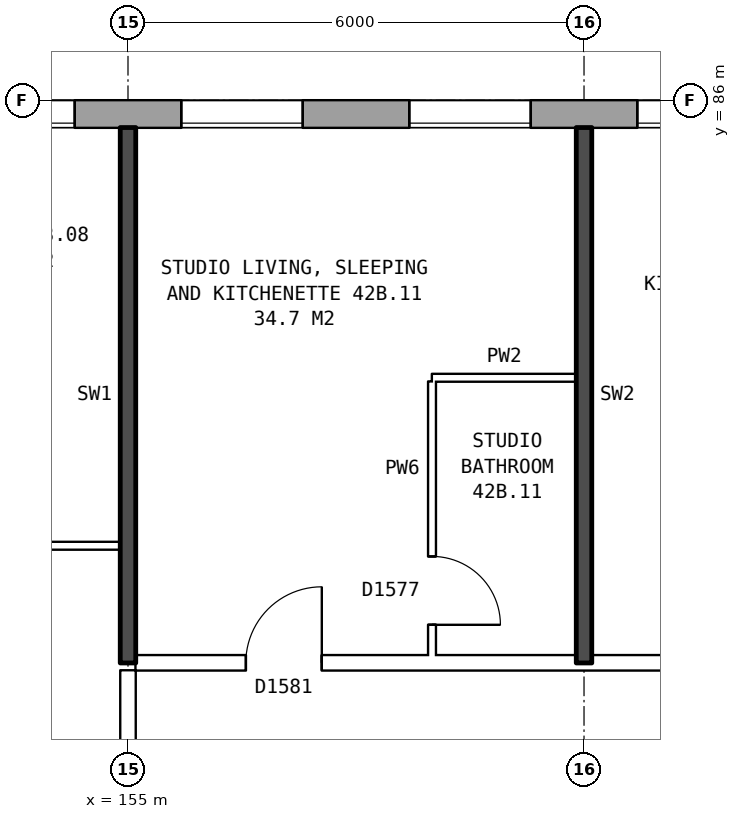
"""IFC4 building model, lengths in metres.
Left out: names, types, materials, properties, quantities, classifications, styles, units other than length and angle.
Written with IfcOpenShell. Run it as: python <this file> out.ifc"""

import sys

from ifc_helpers import new_model, si_unit, direction, frame, frame_2d, origin, place, context, subcontext, project, spatial, rectangle, extrude, element, fill, save


model = new_model("IFC4")
c1 = context("Model", 3, precision=1e-05, world=origin(), true_north=direction((0.0, 1.0)))
c2 = subcontext(c1, "Body", "Model", "MODEL_VIEW")
j1 = project(units=[si_unit("LENGTHUNIT", "METRE"), si_unit("PLANEANGLEUNIT", "RADIAN")], contexts=[c1])
p1 = place(None, origin())
s1 = spatial("IfcSite", under=j1, at=p1, CompositionType="ELEMENT")
p2 = place(p1, origin())
s2 = spatial("IfcBuilding", under=s1, at=p2, CompositionType="ELEMENT")
p3 = place(p2, frame((0.0, 0.0, 151.6)))
s3 = spatial("IfcBuildingStorey", under=s2, at=p3, CompositionType="ELEMENT", Elevation=151.6)
p4 = place(p3, frame((168.425, 85.82, 0.0), z_axis=(0.0, 0.0, 1.0), x_axis=(-1.0, 0.0, 0.0)))
e1 = element("IfcWall", 1, at=p4, inside=s3, PredefinedType="STANDARD", context=c2, shape_type="SweptSolid", body=[
    extrude(rectangle(XDim=34.351, YDim=0.36, at=frame_2d((17.175, 0.0))), origin(), (0.0, 0.0, 1.0), 2.85),
])
p5 = place(p4, frame((3.225, 0.0, 0.8)))
e2 = element("IfcOpeningElement", 2, at=p5, cuts=e1, PredefinedType="OPENING", context=c2, shape_type="SweptSolid", body=[
    extrude(rectangle(XDim=0.6, YDim=0.9, at=frame_2d((0.3, 0.45))), frame((0.0, 0.19, 0.0), z_axis=(0.0, -1.0, 0.0), x_axis=(1.0, 0.0, 0.0)), (0.0, 0.0, 1.0), 0.38),
])
p6 = place(p4, frame((5.125, 0.0, 0.8)))
e3 = element("IfcOpeningElement", 3, at=p6, cuts=e1, PredefinedType="OPENING", context=c2, shape_type="SweptSolid", body=[
    extrude(rectangle(XDim=1.6, YDim=1.8, at=frame_2d((0.8, 0.9))), frame((0.0, 0.19, 0.0), z_axis=(0.0, -1.0, 0.0), x_axis=(1.0, 0.0, 0.0)), (0.0, 0.0, 1.0), 0.38),
])
p7 = place(p4, frame((8.125, 0.0, 0.8)))
e4 = element("IfcOpeningElement", 4, at=p7, cuts=e1, PredefinedType="OPENING", context=c2, shape_type="SweptSolid", body=[
    extrude(rectangle(XDim=1.6, YDim=1.8, at=frame_2d((0.8, 0.9))), frame((0.0, 0.19, 0.0), z_axis=(0.0, -1.0, 0.0), x_axis=(1.0, 0.0, 0.0)), (0.0, 0.0, 1.0), 0.38),
])
p8 = place(p4, frame((11.125, 0.0, 0.8)))
e5 = element("IfcOpeningElement", 5, at=p8, cuts=e1, PredefinedType="OPENING", context=c2, shape_type="SweptSolid", body=[
    extrude(rectangle(XDim=1.6, YDim=1.8, at=frame_2d((0.8, 0.9))), frame((0.0, 0.19, 0.0), z_axis=(0.0, -1.0, 0.0), x_axis=(1.0, 0.0, 0.0)), (0.0, 0.0, 1.0), 0.38),
])
p9 = place(p4, frame((14.125, 0.0, 0.8)))
e6 = element("IfcOpeningElement", 6, at=p9, cuts=e1, PredefinedType="OPENING", context=c2, shape_type="SweptSolid", body=[
    extrude(rectangle(XDim=1.6, YDim=1.8, at=frame_2d((0.8, 0.9))), frame((0.0, 0.19, 0.0), z_axis=(0.0, -1.0, 0.0), x_axis=(1.0, 0.0, 0.0)), (0.0, 0.0, 1.0), 0.38),
])
p10 = place(p4, frame((17.125, 0.0, 0.8)))
e7 = element("IfcOpeningElement", 7, at=p10, cuts=e1, PredefinedType="OPENING", context=c2, shape_type="SweptSolid", body=[
    extrude(rectangle(XDim=1.6, YDim=1.8, at=frame_2d((0.8, 0.9))), frame((0.0, 0.19, 0.0), z_axis=(0.0, -1.0, 0.0), x_axis=(1.0, 0.0, 0.0)), (0.0, 0.0, 1.0), 0.38),
])
p11 = place(p4, frame((20.125, 0.0, 0.8)))
e8 = element("IfcOpeningElement", 8, at=p11, cuts=e1, PredefinedType="OPENING", context=c2, shape_type="SweptSolid", body=[
    extrude(rectangle(XDim=1.6, YDim=1.8, at=frame_2d((0.8, 0.9))), frame((0.0, 0.19, 0.0), z_axis=(0.0, -1.0, 0.0), x_axis=(1.0, 0.0, 0.0)), (0.0, 0.0, 1.0), 0.38),
])
p12 = place(p4, frame((23.125, 0.0, 0.8)))
e9 = element("IfcOpeningElement", 9, at=p12, cuts=e1, PredefinedType="OPENING", context=c2, shape_type="SweptSolid", body=[
    extrude(rectangle(XDim=1.6, YDim=1.8, at=frame_2d((0.8, 0.9))), frame((0.0, 0.19, 0.0), z_axis=(0.0, -1.0, 0.0), x_axis=(1.0, 0.0, 0.0)), (0.0, 0.0, 1.0), 0.38),
])
p13 = place(p4, frame((26.125, 0.0, 0.8)))
e10 = element("IfcOpeningElement", 10, at=p13, cuts=e1, PredefinedType="OPENING", context=c2, shape_type="SweptSolid", body=[
    extrude(rectangle(XDim=1.6, YDim=1.8, at=frame_2d((0.8, 0.9))), frame((0.0, 0.19, 0.0), z_axis=(0.0, -1.0, 0.0), x_axis=(1.0, 0.0, 0.0)), (0.0, 0.0, 1.0), 0.38),
])
p14 = place(p4, frame((28.025, 0.0, 0.8)))
e11 = element("IfcOpeningElement", 11, at=p14, cuts=e1, PredefinedType="OPENING", context=c2, shape_type="SweptSolid", body=[
    extrude(rectangle(XDim=1.4, YDim=1.8, at=frame_2d((0.7, 0.9))), frame((0.0, 0.19, 0.0), z_axis=(0.0, -1.0, 0.0), x_axis=(1.0, 0.0, 0.0)), (0.0, 0.0, 1.0), 0.38),
])
p15 = place(p4, frame((32.275, 0.0, 1.7)))
e12 = element("IfcOpeningElement", 12, at=p15, cuts=e1, PredefinedType="OPENING", context=c2, shape_type="SweptSolid", body=[
    extrude(rectangle(XDim=0.6, YDim=0.9, at=frame_2d((0.3, 0.45))), frame((0.0, 0.19, 0.0), z_axis=(0.0, -1.0, 0.0), x_axis=(1.0, 0.0, 0.0)), (0.0, 0.0, 1.0), 0.38),
])
p16 = place(p4, frame((4.225, 0.0, 0.8)))
e13 = element("IfcOpeningElement", 13, at=p16, cuts=e1, PredefinedType="OPENING", context=c2, shape_type="SweptSolid", body=[
    extrude(rectangle(XDim=0.6, YDim=1.8, at=frame_2d((0.3, 0.9))), frame((0.0, 0.19, 0.0), z_axis=(0.0, -1.0, 0.0), x_axis=(1.0, 0.0, 0.0)), (0.0, 0.0, 1.0), 0.38),
])
p17 = place(p4, frame((29.725, 0.0, 0.8)))
e14 = element("IfcOpeningElement", 14, at=p17, cuts=e1, PredefinedType="OPENING", context=c2, shape_type="SweptSolid", body=[
    extrude(rectangle(XDim=1.0, YDim=1.2, at=frame_2d((0.5, 0.6))), frame((0.0, 0.19, 0.0), z_axis=(0.0, -1.0, 0.0), x_axis=(1.0, 0.0, 0.0)), (0.0, 0.0, 1.0), 0.38),
])
p18 = place(p4, frame((33.225, 0.0, 0.8)))
e15 = element("IfcOpeningElement", 15, at=p18, cuts=e1, PredefinedType="OPENING", context=c2, shape_type="SweptSolid", body=[
    extrude(rectangle(XDim=0.8, YDim=1.8, at=frame_2d((0.4, 0.9))), frame((0.0, 0.19, 0.0), z_axis=(0.0, -1.0, 0.0), x_axis=(1.0, 0.0, 0.0)), (0.0, 0.0, 1.0), 0.38),
])
p19 = place(p3, frame((155.1, 78.6, 0.0), z_axis=(0.0, 0.0, 1.0), x_axis=(1.0, 0.0, 0.0)))
e16 = element("IfcWall", 16, at=p19, inside=s3, PredefinedType="PARTITIONING", context=c2, shape_type="SweptSolid", body=[
    extrude(rectangle(XDim=16.04, YDim=0.2, at=frame_2d((8.02, 0.0))), origin(), (0.0, 0.0, 1.0), 2.85),
])
p20 = place(p19, frame((1.45, 0.0, 0.0)))
e17 = element("IfcOpeningElement", 17, at=p20, cuts=e16, PredefinedType="OPENING", context=c2, shape_type="SweptSolid", body=[
    extrude(rectangle(XDim=1.0, YDim=2.1, at=frame_2d((0.5, 1.05))), frame((0.0, 0.11, 0.0), z_axis=(0.0, -1.0, 0.0), x_axis=(1.0, 0.0, 0.0)), (0.0, 0.0, 1.0), 0.22),
])
p21 = place(p19, frame((8.4, 0.0, 0.0)))
e18 = element("IfcOpeningElement", 18, at=p21, cuts=e16, PredefinedType="OPENING", context=c2, shape_type="SweptSolid", body=[
    extrude(rectangle(XDim=1.0, YDim=2.1, at=frame_2d((0.5, 1.05))), frame((0.0, 0.11, 0.0), z_axis=(0.0, -1.0, 0.0), x_axis=(1.0, 0.0, 0.0)), (0.0, 0.0, 1.0), 0.22),
])
p22 = place(p3, frame((152.0, 80.14, 0.0), z_axis=(0.0, 0.0, 1.0), x_axis=(1.0, 0.0, 0.0)))
e19 = element("IfcWall", 19, at=p22, inside=s3, PredefinedType="PARTITIONING", context=c2, shape_type="SweptSolid", body=[
    extrude(rectangle(XDim=2.9, YDim=0.1, at=frame_2d((1.45, 0.0))), origin(), (0.0, 0.0, 1.0), 2.85),
])
p23 = place(p22, frame((1.0, 0.0, 0.0)))
e20 = element("IfcOpeningElement", 20, at=p23, cuts=e19, PredefinedType="OPENING", context=c2, shape_type="SweptSolid", body=[
    extrude(rectangle(XDim=0.9, YDim=2.1, at=frame_2d((0.45, 1.05))), frame((0.0, 0.06, 0.0), z_axis=(0.0, -1.0, 0.0), x_axis=(1.0, 0.0, 0.0)), (0.0, 0.0, 1.0), 0.12),
])
p24 = place(p3, frame((159.0, 82.35, 0.0), z_axis=(0.0, 0.0, 1.0), x_axis=(1.0, 0.0, 0.0)))
e21 = element("IfcWall", 21, at=p24, inside=s3, PredefinedType="PARTITIONING", context=c2, shape_type="SweptSolid", body=[
    extrude(rectangle(XDim=1.9, YDim=0.1, at=frame_2d((0.95, 0.0))), origin(), (0.0, 0.0, 1.0), 2.85),
])
p25 = place(p3, frame((155.0, 76.3, 0.0), z_axis=(0.0, 0.0, 1.0), x_axis=(0.0, 1.0, 0.0)))
e22 = element("IfcWall", 22, at=p25, inside=s3, PredefinedType="PARTITIONING", context=c2, shape_type="SweptSolid", body=[
    extrude(rectangle(XDim=2.2, YDim=0.2, at=frame_2d((1.1, 0.0))), origin(), (0.0, 0.0, 1.0), 2.85),
])
p26 = place(p3, frame((155.0, 78.6, 0.0), z_axis=(0.0, 0.0, 1.0), x_axis=(0.0, 1.0, 0.0)))
e23 = element("IfcWall", 23, at=p26, inside=s3, PredefinedType="SOLIDWALL", context=c2, shape_type="SweptSolid", body=[
    extrude(rectangle(XDim=7.04, YDim=0.2, at=frame_2d((3.52, 0.0))), origin(), (0.0, 0.0, 1.0), 2.85),
])
p27 = place(p3, frame((159.0, 78.7, 0.0), z_axis=(0.0, 0.0, 1.0), x_axis=(0.0, 1.0, 0.0)))
e24 = element("IfcWall", 24, at=p27, inside=s3, PredefinedType="PARTITIONING", context=c2, shape_type="SweptSolid", body=[
    extrude(rectangle(XDim=3.6, YDim=0.1, at=frame_2d((1.8, 0.0))), origin(), (0.0, 0.0, 1.0), 2.85),
])
p28 = place(p27, frame((0.4, 0.0, 0.0)))
e25 = element("IfcOpeningElement", 25, at=p28, cuts=e24, PredefinedType="OPENING", context=c2, shape_type="SweptSolid", body=[
    extrude(rectangle(XDim=0.9, YDim=2.1, at=frame_2d((0.45, 1.05))), frame((0.0, 0.06, 0.0), z_axis=(0.0, -1.0, 0.0), x_axis=(1.0, 0.0, 0.0)), (0.0, 0.0, 1.0), 0.12),
])
p29 = place(p3, frame((161.0, 78.6, 0.0), z_axis=(0.0, 0.0, 1.0), x_axis=(0.0, 1.0, 0.0)))
e26 = element("IfcWall", 26, at=p29, inside=s3, PredefinedType="SOLIDWALL", context=c2, shape_type="SweptSolid", body=[
    extrude(rectangle(XDim=7.04, YDim=0.2, at=frame_2d((3.52, 0.0))), origin(), (0.0, 0.0, 1.0), 2.85),
])
p30 = place(p6, origin())
e27 = element("IfcWindow", 27, at=p30, inside=s3, PartitioningType="SINGLE_PANEL", PredefinedType="WINDOW", context=c2, shape_type="SweptSolid", body=[
    extrude(rectangle(XDim=1.6, YDim=1.8, at=frame_2d((0.8, 0.9))), frame((0.0, 0.15, 0.0), z_axis=(0.0, -1.0, 0.0), x_axis=(1.0, 0.0, 0.0)), (0.0, 0.0, 1.0), 0.06),
])
fill(e3, e27)
p31 = place(p7, origin())
e28 = element("IfcWindow", 28, at=p31, inside=s3, PartitioningType="SINGLE_PANEL", PredefinedType="WINDOW", context=c2, shape_type="SweptSolid", body=[
    extrude(rectangle(XDim=1.6, YDim=1.8, at=frame_2d((0.8, 0.9))), frame((0.0, 0.15, 0.0), z_axis=(0.0, -1.0, 0.0), x_axis=(1.0, 0.0, 0.0)), (0.0, 0.0, 1.0), 0.06),
])
fill(e4, e28)
p32 = place(p8, origin())
e29 = element("IfcWindow", 29, at=p32, inside=s3, PartitioningType="SINGLE_PANEL", PredefinedType="WINDOW", context=c2, shape_type="SweptSolid", body=[
    extrude(rectangle(XDim=1.6, YDim=1.8, at=frame_2d((0.8, 0.9))), frame((0.0, 0.15, 0.0), z_axis=(0.0, -1.0, 0.0), x_axis=(1.0, 0.0, 0.0)), (0.0, 0.0, 1.0), 0.06),
])
fill(e5, e29)
p33 = place(p9, origin())
e30 = element("IfcWindow", 30, at=p33, inside=s3, PartitioningType="SINGLE_PANEL", PredefinedType="WINDOW", context=c2, shape_type="SweptSolid", body=[
    extrude(rectangle(XDim=1.6, YDim=1.8, at=frame_2d((0.8, 0.9))), frame((0.0, 0.15, 0.0), z_axis=(0.0, -1.0, 0.0), x_axis=(1.0, 0.0, 0.0)), (0.0, 0.0, 1.0), 0.06),
])
fill(e6, e30)
p34 = place(p20, origin())
e31 = element("IfcDoor", 31, at=p34, inside=s3, OperationType="SINGLE_SWING_RIGHT", PredefinedType="DOOR", context=c2, shape_type="SweptSolid", body=[
    extrude(rectangle(XDim=1.0, YDim=2.1, at=frame_2d((0.5, 1.05))), frame((0.0, 0.025, 0.0), z_axis=(0.0, -1.0, 0.0), x_axis=(1.0, 0.0, 0.0)), (0.0, 0.0, 1.0), 0.05),
])
fill(e17, e31)
p35 = place(p28, frame((0.9, 0.0, 0.0), z_axis=(0.0, 0.0, 1.0), x_axis=(-1.0, 0.0, 0.0)))
e32 = element("IfcDoor", 32, at=p35, inside=s3, OperationType="SINGLE_SWING_RIGHT", PredefinedType="DOOR", context=c2, shape_type="SweptSolid", body=[
    extrude(rectangle(XDim=0.9, YDim=2.1, at=frame_2d((0.45, 1.05))), frame((0.0, 0.025, 0.0), z_axis=(0.0, -1.0, 0.0), x_axis=(1.0, 0.0, 0.0)), (0.0, 0.0, 1.0), 0.05),
])
fill(e25, e32)
save(model, sys.argv[1])
